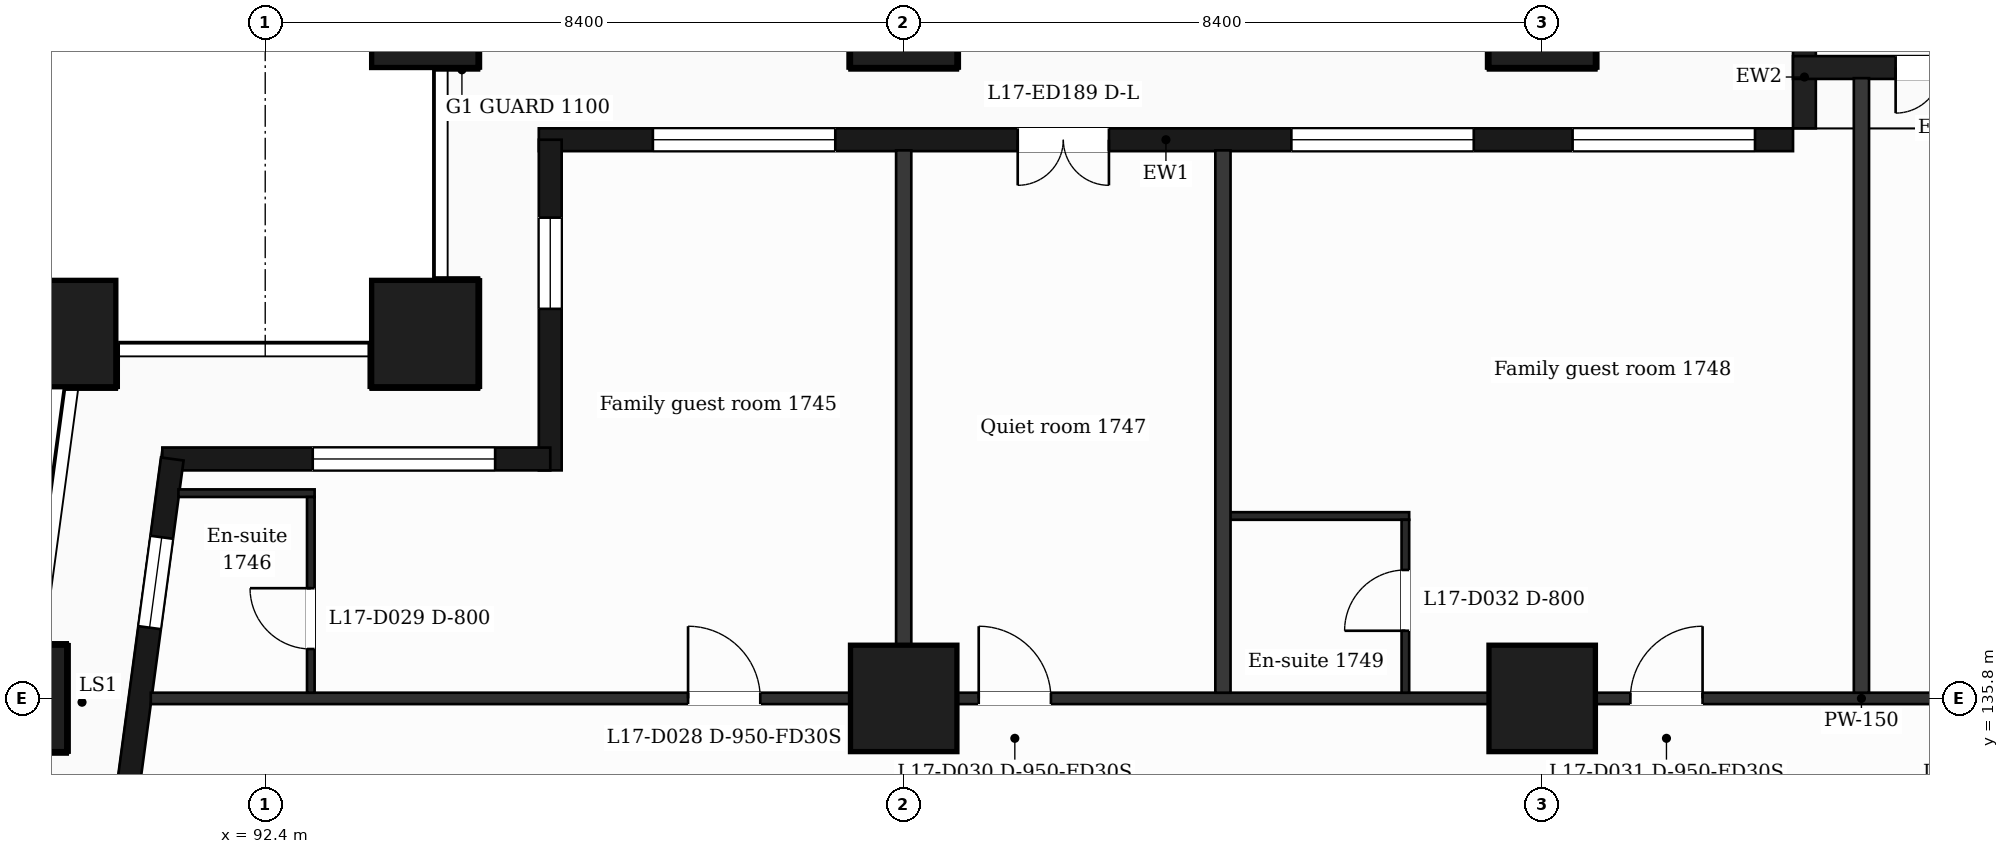
"""IFC4 building model, lengths in metres.
Left out: names, types, materials, properties, quantities, classifications, styles, units other than length and angle.
Written with IfcOpenShell. Run it as: python <this file> out.ifc"""

import sys

from ifc_helpers import new_model, si_unit, direction, frame, frame_2d, origin, origin_2d, place, context, subcontext, project, spatial, rectangle, extrude, element, fill, save


model = new_model("IFC4")
c1 = context("Model", 3, precision=1e-05, world=origin(), true_north=direction((0.0, 1.0)))
c2 = subcontext(c1, "Body", "Model", "MODEL_VIEW")
j1 = project(units=[si_unit("LENGTHUNIT", "METRE"), si_unit("PLANEANGLEUNIT", "RADIAN")], contexts=[c1])
p1 = place(None, origin())
s1 = spatial("IfcSite", under=j1, at=p1, CompositionType="ELEMENT")
p2 = place(p1, origin())
s2 = spatial("IfcBuilding", under=s1, at=p2, CompositionType="ELEMENT")
p3 = place(p2, frame((0.0, 0.0, 77.5)))
s3 = spatial("IfcBuildingStorey", under=s2, at=p3, CompositionType="ELEMENT", Elevation=77.5)
for number, where, z_axis, x_axis in (
    (1, (94.5, 140.6, 0.0), (0.0, 0.0, 1.0), (1.0, 0.0, 0.0)),
    (2, (89.735, 140.6, 0.0), (0.0, 0.0, 1.0), (1.0, 0.0, 0.0)),
    (3, (100.8, 135.8, 0.0), (0.0, 0.0, 1.0), (1.0, 0.0, 0.0)),
    (4, (109.2, 135.8, 0.0), (0.0, 0.0, 1.0), (1.0, 0.0, 0.0)),
    (5, (89.088, 135.8, 0.0), (0.0, 0.0, 1.0), (1.0, 0.0, 0.0)),
    (6, (100.8, 144.8, 0.0), (0.0, 0.0, 1.0), (1.0, 0.0, 0.0)),
    (7, (109.2, 144.8, 0.0), (0.0, 0.0, 1.0), (1.0, 0.0, 0.0)),
    (8, (94.5, 144.8, 0.0), (0.0, 0.0, 1.0), (1.0, 0.0, 0.0)),
):
    element("IfcColumn", number, at=place(p3, frame(where, z_axis=z_axis, x_axis=x_axis)), inside=s3, PredefinedType="COLUMN", context=c2, shape_type="SweptSolid", body=[
        extrude(rectangle(XDim=1.4, YDim=1.4, at=origin_2d()), origin(), (0.0, 0.0, 1.0), 3.5),
    ])
p4 = place(p3, frame((112.5, 143.15, 0.0), z_axis=(0.0, 0.0, 1.0), x_axis=(-1.0, 0.0, 0.0)))
e9 = element("IfcWall", 9, at=p4, inside=s3, PredefinedType="SOLIDWALL", context=c2, shape_type="SweptSolid", body=[
    extrude(rectangle(XDim=16.5, YDim=0.3, at=frame_2d((8.25, 0.0))), origin(), (0.0, 0.0, 1.0), 3.0),
])
p5 = place(p4, frame((0.5, 0.0, 0.9)))
e10 = element("IfcOpeningElement", 10, at=p5, cuts=e9, PredefinedType="OPENING", context=c2, shape_type="SweptSolid", body=[
    extrude(rectangle(XDim=2.4, YDim=2.1, at=frame_2d((1.2, 1.05))), frame((0.0, 0.16, 0.0), z_axis=(0.0, -1.0, 0.0), x_axis=(1.0, 0.0, 0.0)), (0.0, 0.0, 1.0), 0.32),
])
p6 = place(p4, frame((4.2, 0.0, 0.9)))
e11 = element("IfcOpeningElement", 11, at=p6, cuts=e9, PredefinedType="OPENING", context=c2, shape_type="SweptSolid", body=[
    extrude(rectangle(XDim=2.4, YDim=2.1, at=frame_2d((1.2, 1.05))), frame((0.0, 0.16, 0.0), z_axis=(0.0, -1.0, 0.0), x_axis=(1.0, 0.0, 0.0)), (0.0, 0.0, 1.0), 0.32),
])
p7 = place(p4, frame((9.0, 0.0, 0.0)))
e12 = element("IfcOpeningElement", 12, at=p7, cuts=e9, PredefinedType="OPENING", context=c2, shape_type="SweptSolid", body=[
    extrude(rectangle(XDim=1.2, YDim=2.4, at=frame_2d((0.6, 1.2))), frame((0.0, 0.16, 0.0), z_axis=(0.0, -1.0, 0.0), x_axis=(1.0, 0.0, 0.0)), (0.0, 0.0, 1.0), 0.32),
])
p8 = place(p4, frame((12.6, 0.0, 0.9)))
e13 = element("IfcOpeningElement", 13, at=p8, cuts=e9, PredefinedType="OPENING", context=c2, shape_type="SweptSolid", body=[
    extrude(rectangle(XDim=2.4, YDim=2.1, at=frame_2d((1.2, 1.05))), frame((0.0, 0.16, 0.0), z_axis=(0.0, -1.0, 0.0), x_axis=(1.0, 0.0, 0.0)), (0.0, 0.0, 1.0), 0.32),
])
p9 = place(p3, frame((112.65, 143.3, 0.0), z_axis=(0.0, 0.0, 1.0), x_axis=(0.0, 1.0, 0.0)))
e14 = element("IfcWall", 14, at=p9, inside=s3, PredefinedType="SOLIDWALL", context=c2, shape_type="SweptSolid", body=[
    extrude(rectangle(XDim=1.35, YDim=0.3, at=frame_2d((0.675, 0.0))), origin(), (0.0, 0.0, 1.0), 3.0),
])
p10 = place(p3, frame((116.4, 144.1, 0.0), z_axis=(0.0, 0.0, 1.0), x_axis=(-1.0, 0.0, 0.0)))
e15 = element("IfcWall", 15, at=p10, inside=s3, PredefinedType="SOLIDWALL", context=c2, shape_type="SweptSolid", body=[
    extrude(rectangle(XDim=3.9, YDim=0.3, at=frame_2d((1.95, 0.0))), origin(), (0.0, 0.0, 1.0), 3.0),
])
p11 = place(p10, frame((1.35, 0.0, 0.0)))
e16 = element("IfcOpeningElement", 16, at=p11, cuts=e15, PredefinedType="OPENING", context=c2, shape_type="SweptSolid", body=[
    extrude(rectangle(XDim=1.2, YDim=2.4, at=frame_2d((0.6, 1.2))), frame((0.0, 0.16, 0.0), z_axis=(0.0, -1.0, 0.0), x_axis=(1.0, 0.0, 0.0)), (0.0, 0.0, 1.0), 0.32),
])
p12 = place(p3, frame((96.15, 143.15, 0.0), z_axis=(0.0, 0.0, 1.0), x_axis=(0.0, -1.0, 0.0)))
e17 = element("IfcWall", 17, at=p12, inside=s3, PredefinedType="SOLIDWALL", context=c2, shape_type="SweptSolid", body=[
    extrude(rectangle(XDim=4.35, YDim=0.3, at=frame_2d((2.175, 0.0))), origin(), (0.0, 0.0, 1.0), 3.0),
])
p13 = place(p12, frame((1.025, 0.0, 0.9)))
e18 = element("IfcOpeningElement", 18, at=p13, cuts=e17, PredefinedType="OPENING", context=c2, shape_type="SweptSolid", body=[
    extrude(rectangle(XDim=1.2, YDim=2.1, at=frame_2d((0.6, 1.05))), frame((0.0, 0.16, 0.0), z_axis=(0.0, -1.0, 0.0), x_axis=(1.0, 0.0, 0.0)), (0.0, 0.0, 1.0), 0.32),
])
p14 = place(p3, frame((96.15, 138.95, 0.0), z_axis=(0.0, 0.0, 1.0), x_axis=(-1.0, 0.0, 0.0)))
e19 = element("IfcWall", 19, at=p14, inside=s3, PredefinedType="SOLIDWALL", context=c2, shape_type="SweptSolid", body=[
    extrude(rectangle(XDim=5.104, YDim=0.3, at=frame_2d((2.552, 0.0))), origin(), (0.0, 0.0, 1.0), 3.0),
])
p15 = place(p14, frame((0.725, 0.0, 0.9)))
e20 = element("IfcOpeningElement", 20, at=p15, cuts=e19, PredefinedType="OPENING", context=c2, shape_type="SweptSolid", body=[
    extrude(rectangle(XDim=2.4, YDim=2.1, at=frame_2d((1.2, 1.05))), frame((0.0, 0.16, 0.0), z_axis=(0.0, -1.0, 0.0), x_axis=(1.0, 0.0, 0.0)), (0.0, 0.0, 1.0), 0.32),
])
p16 = place(p3, frame((91.177, 138.95, 0.0), z_axis=(0.0, 0.0, 1.0), x_axis=(-0.133426664613, -0.991058689065, 0.0)))
e21 = element("IfcWall", 21, at=p16, inside=s3, PredefinedType="SOLIDWALL", context=c2, shape_type="SweptSolid", body=[
    extrude(rectangle(XDim=6.609, YDim=0.3, at=frame_2d((3.305, 0.0))), origin(), (0.0, 0.0, 1.0), 3.0),
])
p17 = place(p16, frame((1.039, 0.0, 0.9)))
e22 = element("IfcOpeningElement", 22, at=p17, cuts=e21, PredefinedType="OPENING", context=c2, shape_type="SweptSolid", body=[
    extrude(rectangle(XDim=1.2, YDim=2.1, at=frame_2d((0.6, 1.05))), frame((0.0, 0.16, 0.0), z_axis=(0.0, -1.0, 0.0), x_axis=(1.0, 0.0, 0.0)), (0.0, 0.0, 1.0), 0.32),
])
p18 = place(p16, frame((4.294, 0.0, 0.0)))
e23 = element("IfcOpeningElement", 23, at=p18, cuts=e21, PredefinedType="OPENING", context=c2, shape_type="SweptSolid", body=[
    extrude(rectangle(XDim=1.2, YDim=2.4, at=frame_2d((0.6, 1.2))), frame((0.0, 0.16, 0.0), z_axis=(0.0, -1.0, 0.0), x_axis=(1.0, 0.0, 0.0)), (0.0, 0.0, 1.0), 0.32),
])
p19 = place(p3, frame((90.895, 135.8, 0.0), z_axis=(0.0, 0.0, 1.0), x_axis=(1.0, 0.0, 0.0)))
e24 = element("IfcWall", 24, at=p19, inside=s3, PredefinedType="PARTITIONING", context=c2, shape_type="SweptSolid", body=[
    extrude(rectangle(XDim=45.011, YDim=0.15, at=frame_2d((22.505, 0.0))), origin(), (0.0, 0.0, 1.0), 3.0),
])
p20 = place(p19, frame((7.068, 0.0, 0.0)))
e25 = element("IfcOpeningElement", 25, at=p20, cuts=e24, PredefinedType="OPENING", context=c2, shape_type="SweptSolid", body=[
    extrude(rectangle(XDim=0.95, YDim=2.1, at=frame_2d((0.475, 1.05))), frame((0.0, 0.085, 0.0), z_axis=(0.0, -1.0, 0.0), x_axis=(1.0, 0.0, 0.0)), (0.0, 0.0, 1.0), 0.17),
])
p21 = place(p19, frame((10.892, 0.0, 0.0)))
e26 = element("IfcOpeningElement", 26, at=p21, cuts=e24, PredefinedType="OPENING", context=c2, shape_type="SweptSolid", body=[
    extrude(rectangle(XDim=0.95, YDim=2.1, at=frame_2d((0.475, 1.05))), frame((0.0, 0.085, 0.0), z_axis=(0.0, -1.0, 0.0), x_axis=(1.0, 0.0, 0.0)), (0.0, 0.0, 1.0), 0.17),
])
p22 = place(p19, frame((19.465, 0.0, 0.0)))
e27 = element("IfcOpeningElement", 27, at=p22, cuts=e24, PredefinedType="OPENING", context=c2, shape_type="SweptSolid", body=[
    extrude(rectangle(XDim=0.95, YDim=2.1, at=frame_2d((0.475, 1.05))), frame((0.0, 0.085, 0.0), z_axis=(0.0, -1.0, 0.0), x_axis=(1.0, 0.0, 0.0)), (0.0, 0.0, 1.0), 0.17),
])
p23 = place(p19, frame((24.385, 0.0, 0.0)))
e28 = element("IfcOpeningElement", 28, at=p23, cuts=e24, PredefinedType="OPENING", context=c2, shape_type="SweptSolid", body=[
    extrude(rectangle(XDim=0.95, YDim=2.1, at=frame_2d((0.475, 1.05))), frame((0.0, 0.085, 0.0), z_axis=(0.0, -1.0, 0.0), x_axis=(1.0, 0.0, 0.0)), (0.0, 0.0, 1.0), 0.17),
])
p24 = place(p19, frame((30.767, 0.0, 0.0)))
e29 = element("IfcOpeningElement", 29, at=p24, cuts=e24, PredefinedType="OPENING", context=c2, shape_type="SweptSolid", body=[
    extrude(rectangle(XDim=0.95, YDim=2.1, at=frame_2d((0.475, 1.05))), frame((0.0, 0.085, 0.0), z_axis=(0.0, -1.0, 0.0), x_axis=(1.0, 0.0, 0.0)), (0.0, 0.0, 1.0), 0.17),
])
p25 = place(p19, frame((37.915, 0.0, 0.0)))
e30 = element("IfcOpeningElement", 30, at=p25, cuts=e24, PredefinedType="OPENING", context=c2, shape_type="SweptSolid", body=[
    extrude(rectangle(XDim=0.95, YDim=2.1, at=frame_2d((0.475, 1.05))), frame((0.0, 0.085, 0.0), z_axis=(0.0, -1.0, 0.0), x_axis=(1.0, 0.0, 0.0)), (0.0, 0.0, 1.0), 0.17),
])
p26 = place(p3, frame((105.0, 138.2, 0.0), z_axis=(0.0, 0.0, 1.0), x_axis=(1.0, 0.0, 0.0)))
e31 = element("IfcWall", 31, at=p26, inside=s3, PredefinedType="PARTITIONING", context=c2, shape_type="SweptSolid", body=[
    extrude(rectangle(XDim=2.45, YDim=0.1, at=frame_2d((1.225, 0.0))), origin(), (0.0, 0.0, 1.0), 3.0),
])
p27 = place(p3, frame((91.258, 138.5, 0.0), z_axis=(0.0, 0.0, 1.0), x_axis=(1.0, 0.0, 0.0)))
e32 = element("IfcWall", 32, at=p27, inside=s3, PredefinedType="PARTITIONING", context=c2, shape_type="SweptSolid", body=[
    extrude(rectangle(XDim=1.792, YDim=0.1, at=frame_2d((0.896, 0.0))), origin(), (0.0, 0.0, 1.0), 3.0),
])
p28 = place(p3, frame((93.0, 135.875, 0.0), z_axis=(0.0, 0.0, 1.0), x_axis=(0.0, 1.0, 0.0)))
e33 = element("IfcWall", 33, at=p28, inside=s3, PredefinedType="PARTITIONING", context=c2, shape_type="SweptSolid", body=[
    extrude(rectangle(XDim=2.575, YDim=0.1, at=frame_2d((1.288, 0.0))), origin(), (0.0, 0.0, 1.0), 3.0),
])
p29 = place(p28, frame((0.575, 0.0, 0.0)))
e34 = element("IfcOpeningElement", 34, at=p29, cuts=e33, PredefinedType="OPENING", context=c2, shape_type="SweptSolid", body=[
    extrude(rectangle(XDim=0.8, YDim=2.1, at=frame_2d((0.4, 1.05))), frame((0.0, 0.06, 0.0), z_axis=(0.0, -1.0, 0.0), x_axis=(1.0, 0.0, 0.0)), (0.0, 0.0, 1.0), 0.12),
])
for number, where, z_axis, x_axis in (
    (35, (100.8, 135.875, 0.0), (0.0, 0.0, 1.0), (0.0, 1.0, 0.0)),
    (36, (105.0, 135.875, 0.0), (0.0, 0.0, 1.0), (0.0, 1.0, 0.0)),
):
    element("IfcWall", number, at=place(p3, frame(where, z_axis=z_axis, x_axis=x_axis)), inside=s3, PredefinedType="PARTITIONING", context=c2, shape_type="SweptSolid", body=[
        extrude(rectangle(XDim=7.135, YDim=0.2, at=frame_2d((3.567, 0.0))), origin(), (0.0, 0.0, 1.0), 3.0),
    ])
p30 = place(p3, frame((107.4, 135.875, 0.0), z_axis=(0.0, 0.0, 1.0), x_axis=(0.0, 1.0, 0.0)))
e37 = element("IfcWall", 37, at=p30, inside=s3, PredefinedType="PARTITIONING", context=c2, shape_type="SweptSolid", body=[
    extrude(rectangle(XDim=2.275, YDim=0.1, at=frame_2d((1.137, 0.0))), origin(), (0.0, 0.0, 1.0), 3.0),
])
p31 = place(p30, frame((0.815, 0.0, 0.0)))
e38 = element("IfcOpeningElement", 38, at=p31, cuts=e37, PredefinedType="OPENING", context=c2, shape_type="SweptSolid", body=[
    extrude(rectangle(XDim=0.8, YDim=2.1, at=frame_2d((0.4, 1.05))), frame((0.0, 0.06, 0.0), z_axis=(0.0, -1.0, 0.0), x_axis=(1.0, 0.0, 0.0)), (0.0, 0.0, 1.0), 0.12),
])
p32 = place(p3, frame((113.4, 135.875, 0.0), z_axis=(0.0, 0.0, 1.0), x_axis=(0.0, 1.0, 0.0)))
e39 = element("IfcWall", 39, at=p32, inside=s3, PredefinedType="PARTITIONING", context=c2, shape_type="SweptSolid", body=[
    extrude(rectangle(XDim=8.085, YDim=0.2, at=frame_2d((4.042, 0.0))), origin(), (0.0, 0.0, 1.0), 3.0),
])
p33 = place(p5, origin())
e40 = element("IfcWindow", 40, at=p33, inside=s3, PartitioningType="SINGLE_PANEL", PredefinedType="WINDOW", context=c2, shape_type="SweptSolid", body=[
    extrude(rectangle(XDim=2.4, YDim=2.1, at=frame_2d((1.2, 1.05))), frame((0.0, 0.03, 0.0), z_axis=(0.0, -1.0, 0.0), x_axis=(1.0, 0.0, 0.0)), (0.0, 0.0, 1.0), 0.06),
])
fill(e10, e40)
p34 = place(p6, origin())
e41 = element("IfcWindow", 41, at=p34, inside=s3, PartitioningType="SINGLE_PANEL", PredefinedType="WINDOW", context=c2, shape_type="SweptSolid", body=[
    extrude(rectangle(XDim=2.4, YDim=2.1, at=frame_2d((1.2, 1.05))), frame((0.0, 0.03, 0.0), z_axis=(0.0, -1.0, 0.0), x_axis=(1.0, 0.0, 0.0)), (0.0, 0.0, 1.0), 0.06),
])
fill(e11, e41)
p35 = place(p7, origin())
e42 = element("IfcDoor", 42, at=p35, inside=s3, OperationType="DOUBLE_DOOR_SINGLE_SWING", PredefinedType="DOOR", context=c2, shape_type="SweptSolid", body=[
    extrude(rectangle(XDim=1.2, YDim=2.4, at=frame_2d((0.6, 1.2))), frame((0.0, 0.025, 0.0), z_axis=(0.0, -1.0, 0.0), x_axis=(1.0, 0.0, 0.0)), (0.0, 0.0, 1.0), 0.05),
])
fill(e12, e42)
p36 = place(p8, origin())
e43 = element("IfcWindow", 43, at=p36, inside=s3, PartitioningType="SINGLE_PANEL", PredefinedType="WINDOW", context=c2, shape_type="SweptSolid", body=[
    extrude(rectangle(XDim=2.4, YDim=2.1, at=frame_2d((1.2, 1.05))), frame((0.0, 0.03, 0.0), z_axis=(0.0, -1.0, 0.0), x_axis=(1.0, 0.0, 0.0)), (0.0, 0.0, 1.0), 0.06),
])
fill(e13, e43)
p37 = place(p11, origin())
e44 = element("IfcDoor", 44, at=p37, inside=s3, OperationType="DOUBLE_DOOR_SINGLE_SWING", PredefinedType="DOOR", context=c2, shape_type="SweptSolid", body=[
    extrude(rectangle(XDim=1.2, YDim=2.4, at=frame_2d((0.6, 1.2))), frame((0.0, 0.025, 0.0), z_axis=(0.0, -1.0, 0.0), x_axis=(1.0, 0.0, 0.0)), (0.0, 0.0, 1.0), 0.05),
])
fill(e16, e44)
p38 = place(p13, origin())
e45 = element("IfcWindow", 45, at=p38, inside=s3, PartitioningType="SINGLE_PANEL", PredefinedType="WINDOW", context=c2, shape_type="SweptSolid", body=[
    extrude(rectangle(XDim=1.2, YDim=2.1, at=frame_2d((0.6, 1.05))), frame((0.0, 0.03, 0.0), z_axis=(0.0, -1.0, 0.0), x_axis=(1.0, 0.0, 0.0)), (0.0, 0.0, 1.0), 0.06),
])
fill(e18, e45)
p39 = place(p15, origin())
e46 = element("IfcWindow", 46, at=p39, inside=s3, PartitioningType="SINGLE_PANEL", PredefinedType="WINDOW", context=c2, shape_type="SweptSolid", body=[
    extrude(rectangle(XDim=2.4, YDim=2.1, at=frame_2d((1.2, 1.05))), frame((0.0, 0.03, 0.0), z_axis=(0.0, -1.0, 0.0), x_axis=(1.0, 0.0, 0.0)), (0.0, 0.0, 1.0), 0.06),
])
fill(e20, e46)
p40 = place(p17, origin())
e47 = element("IfcWindow", 47, at=p40, inside=s3, PartitioningType="SINGLE_PANEL", PredefinedType="WINDOW", context=c2, shape_type="SweptSolid", body=[
    extrude(rectangle(XDim=1.2, YDim=2.1, at=frame_2d((0.6, 1.05))), frame((0.0, 0.03, 0.0), z_axis=(0.0, -1.0, 0.0), x_axis=(1.0, 0.0, 0.0)), (0.0, 0.0, 1.0), 0.06),
])
fill(e22, e47)
p41 = place(p20, origin())
e48 = element("IfcDoor", 48, at=p41, inside=s3, OperationType="SINGLE_SWING_LEFT", PredefinedType="DOOR", context=c2, shape_type="SweptSolid", body=[
    extrude(rectangle(XDim=0.95, YDim=2.1, at=frame_2d((0.475, 1.05))), frame((0.0, 0.025, 0.0), z_axis=(0.0, -1.0, 0.0), x_axis=(1.0, 0.0, 0.0)), (0.0, 0.0, 1.0), 0.05),
])
fill(e25, e48)
p42 = place(p29, origin())
e49 = element("IfcDoor", 49, at=p42, inside=s3, OperationType="SINGLE_SWING_RIGHT", PredefinedType="DOOR", context=c2, shape_type="SweptSolid", body=[
    extrude(rectangle(XDim=0.8, YDim=2.1, at=frame_2d((0.4, 1.05))), frame((0.0, 0.025, 0.0), z_axis=(0.0, -1.0, 0.0), x_axis=(1.0, 0.0, 0.0)), (0.0, 0.0, 1.0), 0.05),
])
fill(e34, e49)
p43 = place(p21, origin())
e50 = element("IfcDoor", 50, at=p43, inside=s3, OperationType="SINGLE_SWING_LEFT", PredefinedType="DOOR", context=c2, shape_type="SweptSolid", body=[
    extrude(rectangle(XDim=0.95, YDim=2.1, at=frame_2d((0.475, 1.05))), frame((0.0, 0.025, 0.0), z_axis=(0.0, -1.0, 0.0), x_axis=(1.0, 0.0, 0.0)), (0.0, 0.0, 1.0), 0.05),
])
fill(e26, e50)
p44 = place(p22, origin())
e51 = element("IfcDoor", 51, at=p44, inside=s3, OperationType="SINGLE_SWING_RIGHT", PredefinedType="DOOR", context=c2, shape_type="SweptSolid", body=[
    extrude(rectangle(XDim=0.95, YDim=2.1, at=frame_2d((0.475, 1.05))), frame((0.0, 0.025, 0.0), z_axis=(0.0, -1.0, 0.0), x_axis=(1.0, 0.0, 0.0)), (0.0, 0.0, 1.0), 0.05),
])
fill(e27, e51)
p45 = place(p31, origin())
e52 = element("IfcDoor", 52, at=p45, inside=s3, OperationType="SINGLE_SWING_LEFT", PredefinedType="DOOR", context=c2, shape_type="SweptSolid", body=[
    extrude(rectangle(XDim=0.8, YDim=2.1, at=frame_2d((0.4, 1.05))), frame((0.0, 0.025, 0.0), z_axis=(0.0, -1.0, 0.0), x_axis=(1.0, 0.0, 0.0)), (0.0, 0.0, 1.0), 0.05),
])
fill(e38, e52)
save(model, sys.argv[1])
